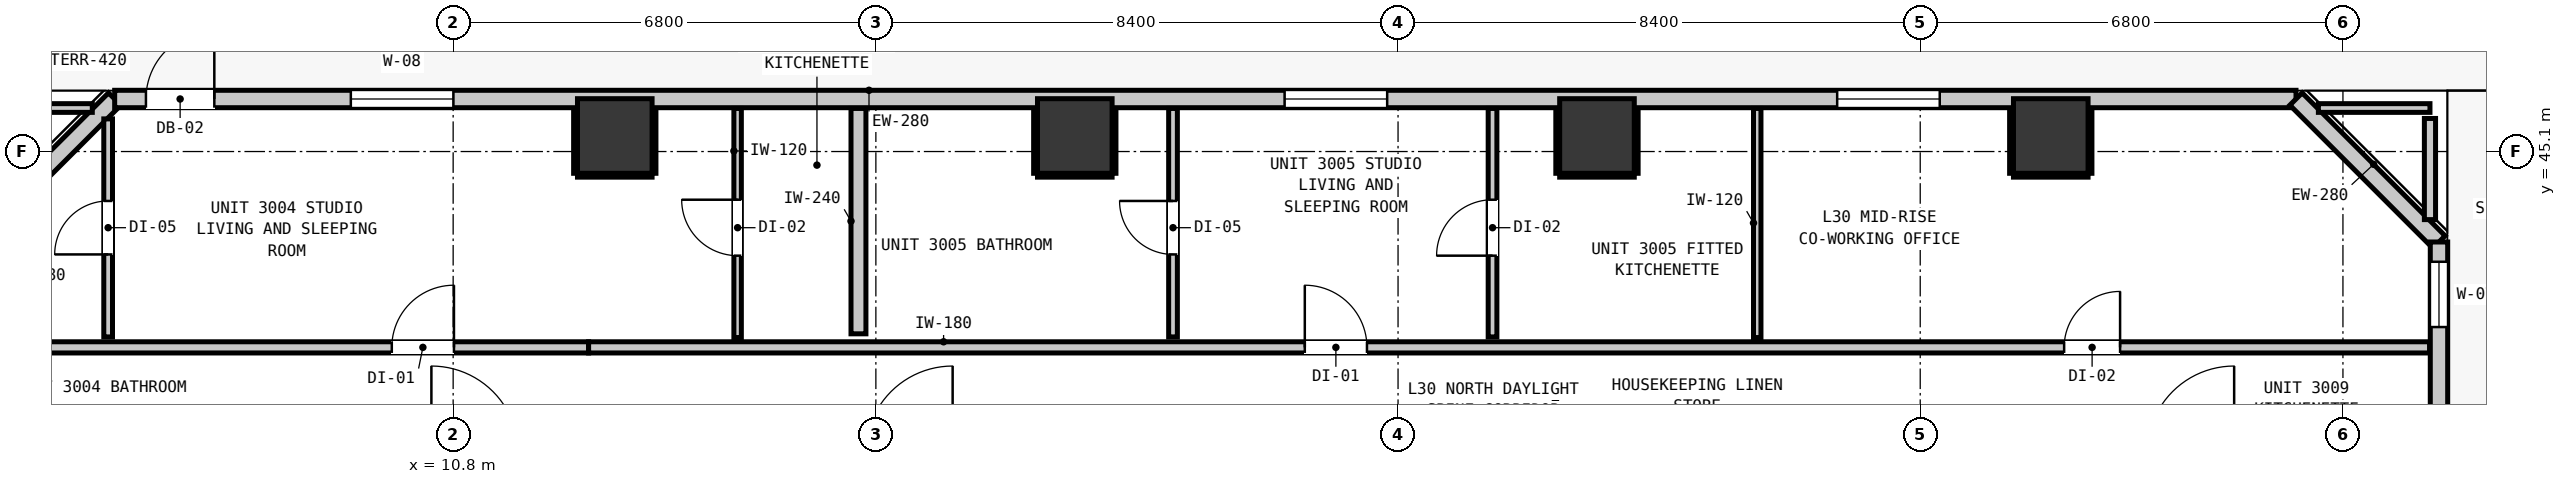
"""IFC4 building model, lengths in metres.
Left out: names, types, materials, properties, quantities, classifications, styles, units other than length and angle.
Written with IfcOpenShell. Run it as: python <this file> out.ifc"""

import sys

from ifc_helpers import new_model, si_unit, direction, frame, frame_2d, origin, origin_2d, place, context, subcontext, project, spatial, rectangle, extrude, element, fill, save


model = new_model("IFC4")
c1 = context("Model", 3, precision=1e-05, world=origin(), true_north=direction((0.0, 1.0)))
c2 = subcontext(c1, "Body", "Model", "MODEL_VIEW")
j1 = project(units=[si_unit("LENGTHUNIT", "METRE"), si_unit("PLANEANGLEUNIT", "RADIAN")], contexts=[c1])
p1 = place(None, origin())
s1 = spatial("IfcSite", under=j1, at=p1, CompositionType="ELEMENT")
p2 = place(p1, origin())
s2 = spatial("IfcBuilding", under=s1, at=p2, CompositionType="ELEMENT")
p3 = place(p2, frame((0.0, 0.0, 106.08)))
s3 = spatial("IfcBuildingStorey", under=s2, at=p3, CompositionType="ELEMENT", Elevation=106.08)
for number, where, z_axis, x_axis in (
    (1, (13.4, 45.35, -0.2), (0.0, 0.0, 1.0), (1.0, 0.0, 0.0)),
    (2, (20.8, 45.35, -0.2), (0.0, 0.0, 1.0), (1.0, 0.0, 0.0)),
    (3, (29.2, 45.35, -0.2), (0.0, 0.0, 1.0), (1.0, 0.0, 0.0)),
    (4, (36.5, 45.35, -0.2), (0.0, 0.0, 1.0), (1.0, 0.0, 0.0)),
):
    element("IfcColumn", number, at=place(p3, frame(where, z_axis=z_axis, x_axis=x_axis)), inside=s3, PredefinedType="COLUMN", context=c2, shape_type="SweptSolid", body=[
        extrude(rectangle(XDim=1.2, YDim=1.2, at=origin_2d()), origin(), (0.0, 0.0, 1.0), 3.52),
    ])
p4 = place(p3, frame((3.055, 43.645, 0.0), z_axis=(0.0, 0.0, 1.0), x_axis=(0.707106781187, 0.707106781187, 0.0)))
e5 = element("IfcWall", 5, at=p4, inside=s3, PredefinedType="STANDARD", context=c2, shape_type="SweptSolid", body=[
    extrude(rectangle(XDim=3.253, YDim=0.28, at=frame_2d((1.626, 0.0))), origin(), (0.0, 0.0, 1.0), 3.08),
])
p5 = place(p3, frame((5.355, 45.945, 0.0), z_axis=(0.0, 0.0, 1.0), x_axis=(1.0, 0.0, 0.0)))
e6 = element("IfcWall", 6, at=p5, inside=s3, PredefinedType="STANDARD", context=c2, shape_type="SweptSolid", body=[
    extrude(rectangle(XDim=35.09, YDim=0.28, at=frame_2d((17.545, 0.0))), origin(), (0.0, 0.0, 1.0), 3.08),
])
p6 = place(p5, frame((0.503, 0.0, 0.0)))
e7 = element("IfcOpeningElement", 7, at=p6, cuts=e6, PredefinedType="OPENING", context=c2, shape_type="SweptSolid", body=[
    extrude(rectangle(XDim=1.1, YDim=2.15, at=frame_2d((0.55, 1.075))), frame((0.0, 0.15, 0.0), z_axis=(0.0, -1.0, 0.0), x_axis=(1.0, 0.0, 0.0)), (0.0, 0.0, 1.0), 0.3),
])
p7 = place(p5, frame((3.799, 0.0, 0.85)))
e8 = element("IfcOpeningElement", 8, at=p7, cuts=e6, PredefinedType="OPENING", context=c2, shape_type="SweptSolid", body=[
    extrude(rectangle(XDim=1.65, YDim=1.75, at=frame_2d((0.825, 0.875))), frame((0.0, 0.15, 0.0), z_axis=(0.0, -1.0, 0.0), x_axis=(1.0, 0.0, 0.0)), (0.0, 0.0, 1.0), 0.3),
])
p8 = place(p5, frame((18.82, 0.0, 0.85)))
e9 = element("IfcOpeningElement", 9, at=p8, cuts=e6, PredefinedType="OPENING", context=c2, shape_type="SweptSolid", body=[
    extrude(rectangle(XDim=1.65, YDim=1.75, at=frame_2d((0.825, 0.875))), frame((0.0, 0.15, 0.0), z_axis=(0.0, -1.0, 0.0), x_axis=(1.0, 0.0, 0.0)), (0.0, 0.0, 1.0), 0.3),
])
p9 = place(p5, frame((27.709, 0.0, 0.85)))
e10 = element("IfcOpeningElement", 10, at=p9, cuts=e6, PredefinedType="OPENING", context=c2, shape_type="SweptSolid", body=[
    extrude(rectangle(XDim=1.65, YDim=1.75, at=frame_2d((0.825, 0.875))), frame((0.0, 0.15, 0.0), z_axis=(0.0, -1.0, 0.0), x_axis=(1.0, 0.0, 0.0)), (0.0, 0.0, 1.0), 0.3),
])
p10 = place(p3, frame((40.445, 45.945, 0.0), z_axis=(0.0, 0.0, 1.0), x_axis=(0.707106781187, -0.707106781187, 0.0)))
e11 = element("IfcWall", 11, at=p10, inside=s3, PredefinedType="STANDARD", context=c2, shape_type="SweptSolid", body=[
    extrude(rectangle(XDim=3.253, YDim=0.28, at=frame_2d((1.626, 0.0))), origin(), (0.0, 0.0, 1.0), 3.08),
])
p11 = place(p3, frame((42.745, 43.645, 0.0), z_axis=(0.0, 0.0, 1.0), x_axis=(0.0, -1.0, 0.0)))
e12 = element("IfcWall", 12, at=p11, inside=s3, PredefinedType="STANDARD", context=c2, shape_type="SweptSolid", body=[
    extrude(rectangle(XDim=32.29, YDim=0.28, at=frame_2d((16.145, 0.0))), origin(), (0.0, 0.0, 1.0), 3.08),
])
p12 = place(p11, frame((6.821, 0.0, 0.0)))
e13 = element("IfcOpeningElement", 13, at=p12, cuts=e12, PredefinedType="OPENING", context=c2, shape_type="SweptSolid", body=[
    extrude(rectangle(XDim=1.1, YDim=2.15, at=frame_2d((0.55, 1.075))), frame((0.0, 0.15, 0.0), z_axis=(0.0, -1.0, 0.0), x_axis=(1.0, 0.0, 0.0)), (0.0, 0.0, 1.0), 0.3),
])
p13 = place(p11, frame((0.318, 0.0, 0.85)))
e14 = element("IfcOpeningElement", 14, at=p13, cuts=e12, PredefinedType="OPENING", context=c2, shape_type="SweptSolid", body=[
    extrude(rectangle(XDim=1.05, YDim=1.65, at=frame_2d((0.525, 0.825))), frame((0.0, 0.15, 0.0), z_axis=(0.0, -1.0, 0.0), x_axis=(1.0, 0.0, 0.0)), (0.0, 0.0, 1.0), 0.3),
])
p14 = place(p11, frame((16.895, 0.0, 0.85)))
e15 = element("IfcOpeningElement", 15, at=p14, cuts=e12, PredefinedType="OPENING", context=c2, shape_type="SweptSolid", body=[
    extrude(rectangle(XDim=1.65, YDim=1.75, at=frame_2d((0.825, 0.875))), frame((0.0, 0.15, 0.0), z_axis=(0.0, -1.0, 0.0), x_axis=(1.0, 0.0, 0.0)), (0.0, 0.0, 1.0), 0.3),
])
p15 = place(p11, frame((8.477, 0.0, 0.85)))
e16 = element("IfcOpeningElement", 16, at=p15, cuts=e12, PredefinedType="OPENING", context=c2, shape_type="SweptSolid", body=[
    extrude(rectangle(XDim=1.05, YDim=1.65, at=frame_2d((0.525, 0.825))), frame((0.0, 0.15, 0.0), z_axis=(0.0, -1.0, 0.0), x_axis=(1.0, 0.0, 0.0)), (0.0, 0.0, 1.0), 0.3),
])
p16 = place(p3, frame((4.071, 41.95, 0.0), z_axis=(0.0, 0.0, 1.0), x_axis=(1.0, 0.0, 0.0)))
e17 = element("IfcWall", 17, at=p16, inside=s3, PredefinedType="PARTITIONING", context=c2, shape_type="SweptSolid", body=[
    extrude(rectangle(XDim=8.908, YDim=0.18, at=frame_2d((4.454, 0.0))), origin(), (0.0, 0.0, 1.0), 2.565),
])
p17 = place(p16, frame((5.742, 0.0, 0.0)))
e18 = element("IfcOpeningElement", 18, at=p17, cuts=e17, PredefinedType="OPENING", context=c2, shape_type="SweptSolid", body=[
    extrude(rectangle(XDim=1.0, YDim=2.15, at=frame_2d((0.5, 1.075))), frame((0.0, 0.1, 0.0), z_axis=(0.0, -1.0, 0.0), x_axis=(1.0, 0.0, 0.0)), (0.0, 0.0, 1.0), 0.2),
])
p18 = place(p3, frame((12.979, 41.95, 0.0), z_axis=(0.0, 0.0, 1.0), x_axis=(1.0, 0.0, 0.0)))
e19 = element("IfcWall", 19, at=p18, inside=s3, PredefinedType="PARTITIONING", context=c2, shape_type="SweptSolid", body=[
    extrude(rectangle(XDim=29.614, YDim=0.18, at=frame_2d((14.807, 0.0))), origin(), (0.0, 0.0, 1.0), 3.08),
])
p19 = place(p18, frame((11.521, 0.0, 0.0)))
e20 = element("IfcOpeningElement", 20, at=p19, cuts=e19, PredefinedType="OPENING", context=c2, shape_type="SweptSolid", body=[
    extrude(rectangle(XDim=1.0, YDim=2.15, at=frame_2d((0.5, 1.075))), frame((0.0, 0.1, 0.0), z_axis=(0.0, -1.0, 0.0), x_axis=(1.0, 0.0, 0.0)), (0.0, 0.0, 1.0), 0.2),
])
p20 = place(p18, frame((23.736, 0.0, 0.0)))
e21 = element("IfcOpeningElement", 21, at=p20, cuts=e19, PredefinedType="OPENING", context=c2, shape_type="SweptSolid", body=[
    extrude(rectangle(XDim=0.9, YDim=2.1, at=frame_2d((0.45, 1.05))), frame((0.0, 0.1, 0.0), z_axis=(0.0, -1.0, 0.0), x_axis=(1.0, 0.0, 0.0)), (0.0, 0.0, 1.0), 0.2),
])
for number, where, z_axis, x_axis in (
    (22, (3.2, 45.8, 0.0), (0.0, 0.0, 1.0), (1.0, 0.0, 0.0)),
    (23, (40.805, 45.8, 0.0), (0.0, 0.0, 1.0), (1.0, 0.0, 0.0)),
):
    element("IfcWall", number, at=place(p3, frame(where, z_axis=z_axis, x_axis=x_axis)), inside=s3, PredefinedType="PARTITIONING", context=c2, shape_type="SweptSolid", body=[
        extrude(rectangle(XDim=1.795, YDim=0.14, at=frame_2d((0.897, 0.0))), origin(), (0.0, 0.0, 1.0), 3.08),
    ])
p21 = place(p3, frame((17.32, 42.168, 0.0), z_axis=(0.0, 0.0, 1.0), x_axis=(0.0, 1.0, 0.0)))
e24 = element("IfcWall", 24, at=p21, inside=s3, PredefinedType="PARTITIONING", context=c2, shape_type="SweptSolid", body=[
    extrude(rectangle(XDim=3.625, YDim=0.24, at=frame_2d((1.812, 0.0))), origin(), (0.0, 0.0, 1.0), 3.08),
])
p22 = place(p3, frame((42.6, 44.005, 0.0), z_axis=(0.0, 0.0, 1.0), x_axis=(0.0, 1.0, 0.0)))
e25 = element("IfcWall", 25, at=p22, inside=s3, PredefinedType="PARTITIONING", context=c2, shape_type="SweptSolid", body=[
    extrude(rectangle(XDim=1.627, YDim=0.18, at=frame_2d((0.813, 0.0))), origin(), (0.0, 0.0, 1.0), 3.08),
])
p23 = place(p3, frame((5.25, 42.118, 0.0), z_axis=(0.0, 0.0, 1.0), x_axis=(0.0, 1.0, 0.0)))
e26 = element("IfcWall", 26, at=p23, inside=s3, PredefinedType="PARTITIONING", context=c2, shape_type="SweptSolid", body=[
    extrude(rectangle(XDim=3.507, YDim=0.14, at=frame_2d((1.753, 0.0))), origin(), (0.0, 0.0, 1.0), 3.08),
])
p24 = place(p23, frame((1.327, 0.0, 0.0)))
e27 = element("IfcOpeningElement", 27, at=p24, cuts=e26, PredefinedType="OPENING", context=c2, shape_type="SweptSolid", body=[
    extrude(rectangle(XDim=0.86, YDim=2.02, at=frame_2d((0.43, 1.01))), frame((0.0, 0.08, 0.0), z_axis=(0.0, -1.0, 0.0), x_axis=(1.0, 0.0, 0.0)), (0.0, 0.0, 1.0), 0.16),
])
p25 = place(p3, frame((22.38, 42.118, 0.0), z_axis=(0.0, 0.0, 1.0), x_axis=(0.0, 1.0, 0.0)))
e28 = element("IfcWall", 28, at=p25, inside=s3, PredefinedType="PARTITIONING", context=c2, shape_type="SweptSolid", body=[
    extrude(rectangle(XDim=3.675, YDim=0.14, at=frame_2d((1.837, 0.0))), origin(), (0.0, 0.0, 1.0), 3.08),
])
p26 = place(p25, frame((1.327, 0.0, 0.0)))
e29 = element("IfcOpeningElement", 29, at=p26, cuts=e28, PredefinedType="OPENING", context=c2, shape_type="SweptSolid", body=[
    extrude(rectangle(XDim=0.86, YDim=2.02, at=frame_2d((0.43, 1.01))), frame((0.0, 0.08, 0.0), z_axis=(0.0, -1.0, 0.0), x_axis=(1.0, 0.0, 0.0)), (0.0, 0.0, 1.0), 0.16),
])
p27 = place(p3, frame((27.52, 42.118, 0.0), z_axis=(0.0, 0.0, 1.0), x_axis=(0.0, 1.0, 0.0)))
e30 = element("IfcWall", 30, at=p27, inside=s3, PredefinedType="PARTITIONING", context=c2, shape_type="SweptSolid", body=[
    extrude(rectangle(XDim=3.675, YDim=0.14, at=frame_2d((1.837, 0.0))), origin(), (0.0, 0.0, 1.0), 3.08),
])
p28 = place(p27, frame((1.307, 0.0, 0.0)))
e31 = element("IfcOpeningElement", 31, at=p28, cuts=e30, PredefinedType="OPENING", context=c2, shape_type="SweptSolid", body=[
    extrude(rectangle(XDim=0.9, YDim=2.1, at=frame_2d((0.45, 1.05))), frame((0.0, 0.08, 0.0), z_axis=(0.0, -1.0, 0.0), x_axis=(1.0, 0.0, 0.0)), (0.0, 0.0, 1.0), 0.16),
])
p29 = place(p3, frame((15.376, 42.108, 0.0), z_axis=(0.0, 0.0, 1.0), x_axis=(0.0, 1.0, 0.0)))
e32 = element("IfcWall", 32, at=p29, inside=s3, PredefinedType="PARTITIONING", context=c2, shape_type="SweptSolid", body=[
    extrude(rectangle(XDim=3.685, YDim=0.12, at=frame_2d((1.843, 0.0))), origin(), (0.0, 0.0, 1.0), 3.08),
])
p30 = place(p29, frame((1.317, 0.0, 0.0)))
e33 = element("IfcOpeningElement", 33, at=p30, cuts=e32, PredefinedType="OPENING", context=c2, shape_type="SweptSolid", body=[
    extrude(rectangle(XDim=0.9, YDim=2.1, at=frame_2d((0.45, 1.05))), frame((0.0, 0.07, 0.0), z_axis=(0.0, -1.0, 0.0), x_axis=(1.0, 0.0, 0.0)), (0.0, 0.0, 1.0), 0.14),
])
p31 = place(p3, frame((31.778, 42.108, 0.0), z_axis=(0.0, 0.0, 1.0), x_axis=(0.0, 1.0, 0.0)))
e34 = element("IfcWall", 34, at=p31, inside=s3, PredefinedType="PARTITIONING", context=c2, shape_type="SweptSolid", body=[
    extrude(rectangle(XDim=3.685, YDim=0.12, at=frame_2d((1.843, 0.0))), origin(), (0.0, 0.0, 1.0), 3.08),
])
p32 = place(p3, frame((12.8, 44.718, 0.0), z_axis=(0.0, 0.0, 1.0), x_axis=(1.0, 0.0, 0.0)))
e35 = element("IfcWall", 35, at=p32, inside=s3, PredefinedType="PARTITIONING", context=c2, shape_type="SweptSolid", body=[
    extrude(rectangle(XDim=1.2, YDim=0.06, at=frame_2d((0.6, 0.0))), origin(), (0.0, 0.0, 1.0), 1.45),
])
for number, where, z_axis, x_axis in (
    (36, (12.768, 44.75, 0.0), (0.0, 0.0, 1.0), (0.0, 1.0, 0.0)),
    (37, (14.032, 44.75, 0.0), (0.0, 0.0, 1.0), (0.0, 1.0, 0.0)),
):
    element("IfcWall", number, at=place(p3, frame(where, z_axis=z_axis, x_axis=x_axis)), inside=s3, PredefinedType="PARTITIONING", context=c2, shape_type="SweptSolid", body=[
        extrude(rectangle(XDim=1.04, YDim=0.06, at=frame_2d((0.52, 0.0))), origin(), (0.0, 0.0, 1.0), 1.45),
    ])
p33 = place(p3, frame((20.2, 44.718, 0.0), z_axis=(0.0, 0.0, 1.0), x_axis=(1.0, 0.0, 0.0)))
e38 = element("IfcWall", 38, at=p33, inside=s3, PredefinedType="PARTITIONING", context=c2, shape_type="SweptSolid", body=[
    extrude(rectangle(XDim=1.2, YDim=0.06, at=frame_2d((0.6, 0.0))), origin(), (0.0, 0.0, 1.0), 1.45),
])
for number, where, z_axis, x_axis in (
    (39, (20.168, 44.75, 0.0), (0.0, 0.0, 1.0), (0.0, 1.0, 0.0)),
    (40, (21.432, 44.75, 0.0), (0.0, 0.0, 1.0), (0.0, 1.0, 0.0)),
):
    element("IfcWall", number, at=place(p3, frame(where, z_axis=z_axis, x_axis=x_axis)), inside=s3, PredefinedType="PARTITIONING", context=c2, shape_type="SweptSolid", body=[
        extrude(rectangle(XDim=1.04, YDim=0.06, at=frame_2d((0.52, 0.0))), origin(), (0.0, 0.0, 1.0), 1.45),
    ])
p34 = place(p3, frame((28.6, 44.718, 0.0), z_axis=(0.0, 0.0, 1.0), x_axis=(1.0, 0.0, 0.0)))
e41 = element("IfcWall", 41, at=p34, inside=s3, PredefinedType="PARTITIONING", context=c2, shape_type="SweptSolid", body=[
    extrude(rectangle(XDim=1.2, YDim=0.06, at=frame_2d((0.6, 0.0))), origin(), (0.0, 0.0, 1.0), 1.45),
])
for number, where, z_axis, x_axis in (
    (42, (28.568, 44.75, 0.0), (0.0, 0.0, 1.0), (0.0, 1.0, 0.0)),
    (43, (29.832, 44.75, 0.0), (0.0, 0.0, 1.0), (0.0, 1.0, 0.0)),
):
    element("IfcWall", number, at=place(p3, frame(where, z_axis=z_axis, x_axis=x_axis)), inside=s3, PredefinedType="PARTITIONING", context=c2, shape_type="SweptSolid", body=[
        extrude(rectangle(XDim=1.04, YDim=0.06, at=frame_2d((0.52, 0.0))), origin(), (0.0, 0.0, 1.0), 1.45),
    ])
p35 = place(p3, frame((35.9, 44.718, 0.0), z_axis=(0.0, 0.0, 1.0), x_axis=(1.0, 0.0, 0.0)))
e44 = element("IfcWall", 44, at=p35, inside=s3, PredefinedType="PARTITIONING", context=c2, shape_type="SweptSolid", body=[
    extrude(rectangle(XDim=1.2, YDim=0.06, at=frame_2d((0.6, 0.0))), origin(), (0.0, 0.0, 1.0), 1.45),
])
for number, where, z_axis, x_axis in (
    (45, (35.868, 44.75, 0.0), (0.0, 0.0, 1.0), (0.0, 1.0, 0.0)),
    (46, (37.132, 44.75, 0.0), (0.0, 0.0, 1.0), (0.0, 1.0, 0.0)),
):
    element("IfcWall", number, at=place(p3, frame(where, z_axis=z_axis, x_axis=x_axis)), inside=s3, PredefinedType="PARTITIONING", context=c2, shape_type="SweptSolid", body=[
        extrude(rectangle(XDim=1.04, YDim=0.06, at=frame_2d((0.52, 0.0))), origin(), (0.0, 0.0, 1.0), 1.45),
    ])
p36 = place(p6, origin())
e47 = element("IfcDoor", 47, at=p36, inside=s3, OperationType="SINGLE_SWING_RIGHT", PredefinedType="DOOR", context=c2, shape_type="SweptSolid", body=[
    extrude(rectangle(XDim=1.1, YDim=2.15, at=frame_2d((0.55, 1.075))), frame((0.0, 0.025, 0.0), z_axis=(0.0, -1.0, 0.0), x_axis=(1.0, 0.0, 0.0)), (0.0, 0.0, 1.0), 0.05),
])
fill(e7, e47)
p37 = place(p7, origin())
e48 = element("IfcWindow", 48, at=p37, inside=s3, PartitioningType="SINGLE_PANEL", PredefinedType="WINDOW", context=c2, shape_type="SweptSolid", body=[
    extrude(rectangle(XDim=1.65, YDim=1.75, at=frame_2d((0.825, 0.875))), frame((0.0, 0.03, 0.0), z_axis=(0.0, -1.0, 0.0), x_axis=(1.0, 0.0, 0.0)), (0.0, 0.0, 1.0), 0.06),
])
fill(e8, e48)
p38 = place(p8, origin())
e49 = element("IfcWindow", 49, at=p38, inside=s3, PartitioningType="SINGLE_PANEL", PredefinedType="WINDOW", context=c2, shape_type="SweptSolid", body=[
    extrude(rectangle(XDim=1.65, YDim=1.75, at=frame_2d((0.825, 0.875))), frame((0.0, 0.03, 0.0), z_axis=(0.0, -1.0, 0.0), x_axis=(1.0, 0.0, 0.0)), (0.0, 0.0, 1.0), 0.06),
])
fill(e9, e49)
p39 = place(p9, origin())
e50 = element("IfcWindow", 50, at=p39, inside=s3, PartitioningType="SINGLE_PANEL", PredefinedType="WINDOW", context=c2, shape_type="SweptSolid", body=[
    extrude(rectangle(XDim=1.65, YDim=1.75, at=frame_2d((0.825, 0.875))), frame((0.0, 0.03, 0.0), z_axis=(0.0, -1.0, 0.0), x_axis=(1.0, 0.0, 0.0)), (0.0, 0.0, 1.0), 0.06),
])
fill(e10, e50)
p40 = place(p13, origin())
e51 = element("IfcWindow", 51, at=p40, inside=s3, PartitioningType="SINGLE_PANEL", PredefinedType="WINDOW", context=c2, shape_type="SweptSolid", body=[
    extrude(rectangle(XDim=1.05, YDim=1.65, at=frame_2d((0.525, 0.825))), frame((0.0, 0.03, 0.0), z_axis=(0.0, -1.0, 0.0), x_axis=(1.0, 0.0, 0.0)), (0.0, 0.0, 1.0), 0.06),
])
fill(e14, e51)
p41 = place(p17, origin())
e52 = element("IfcDoor", 52, at=p41, inside=s3, OperationType="SINGLE_SWING_RIGHT", PredefinedType="DOOR", context=c2, shape_type="SweptSolid", body=[
    extrude(rectangle(XDim=1.0, YDim=2.15, at=frame_2d((0.5, 1.075))), frame((0.0, 0.025, 0.0), z_axis=(0.0, -1.0, 0.0), x_axis=(1.0, 0.0, 0.0)), (0.0, 0.0, 1.0), 0.05),
])
fill(e18, e52)
p42 = place(p24, origin())
e53 = element("IfcDoor", 53, at=p42, inside=s3, OperationType="SINGLE_SWING_LEFT", PredefinedType="DOOR", context=c2, shape_type="SweptSolid", body=[
    extrude(rectangle(XDim=0.86, YDim=2.02, at=frame_2d((0.43, 1.01))), frame((0.0, 0.025, 0.0), z_axis=(0.0, -1.0, 0.0), x_axis=(1.0, 0.0, 0.0)), (0.0, 0.0, 1.0), 0.05),
])
fill(e27, e53)
p43 = place(p30, origin())
e54 = element("IfcDoor", 54, at=p43, inside=s3, OperationType="SINGLE_SWING_RIGHT", PredefinedType="DOOR", context=c2, shape_type="SweptSolid", body=[
    extrude(rectangle(XDim=0.9, YDim=2.1, at=frame_2d((0.45, 1.05))), frame((0.0, 0.025, 0.0), z_axis=(0.0, -1.0, 0.0), x_axis=(1.0, 0.0, 0.0)), (0.0, 0.0, 1.0), 0.05),
])
fill(e33, e54)
p44 = place(p19, origin())
e55 = element("IfcDoor", 55, at=p44, inside=s3, OperationType="SINGLE_SWING_LEFT", PredefinedType="DOOR", context=c2, shape_type="SweptSolid", body=[
    extrude(rectangle(XDim=1.0, YDim=2.15, at=frame_2d((0.5, 1.075))), frame((0.0, 0.025, 0.0), z_axis=(0.0, -1.0, 0.0), x_axis=(1.0, 0.0, 0.0)), (0.0, 0.0, 1.0), 0.05),
])
fill(e20, e55)
p45 = place(p26, origin())
e56 = element("IfcDoor", 56, at=p45, inside=s3, OperationType="SINGLE_SWING_RIGHT", PredefinedType="DOOR", context=c2, shape_type="SweptSolid", body=[
    extrude(rectangle(XDim=0.86, YDim=2.02, at=frame_2d((0.43, 1.01))), frame((0.0, 0.025, 0.0), z_axis=(0.0, -1.0, 0.0), x_axis=(1.0, 0.0, 0.0)), (0.0, 0.0, 1.0), 0.05),
])
fill(e29, e56)
p46 = place(p28, origin())
e57 = element("IfcDoor", 57, at=p46, inside=s3, OperationType="SINGLE_SWING_LEFT", PredefinedType="DOOR", context=c2, shape_type="SweptSolid", body=[
    extrude(rectangle(XDim=0.9, YDim=2.1, at=frame_2d((0.45, 1.05))), frame((0.0, 0.025, 0.0), z_axis=(0.0, -1.0, 0.0), x_axis=(1.0, 0.0, 0.0)), (0.0, 0.0, 1.0), 0.05),
])
fill(e31, e57)
p47 = place(p20, origin())
e58 = element("IfcDoor", 58, at=p47, inside=s3, OperationType="SINGLE_SWING_RIGHT", PredefinedType="DOOR", context=c2, shape_type="SweptSolid", body=[
    extrude(rectangle(XDim=0.9, YDim=2.1, at=frame_2d((0.45, 1.05))), frame((0.0, 0.025, 0.0), z_axis=(0.0, -1.0, 0.0), x_axis=(1.0, 0.0, 0.0)), (0.0, 0.0, 1.0), 0.05),
])
fill(e21, e58)
save(model, sys.argv[1])
